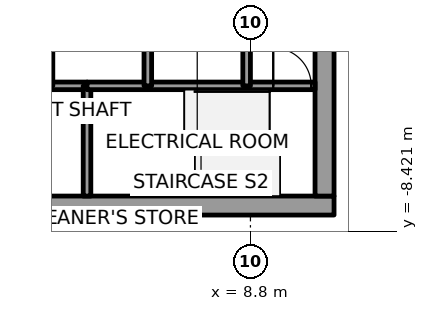
"""IFC4 building model, lengths in metres.
Left out: names, types, materials, properties, quantities, classifications, styles, units other than length and angle.
Written with IfcOpenShell. Run it as: python <this file> out.ifc"""

import sys

from ifc_helpers import new_model, si_unit, direction, frame, frame_2d, origin, place, context, subcontext, project, spatial, rectangle, extrude, element, fill, save


model = new_model("IFC4")
c1 = context("Model", 3, precision=1e-05, world=origin(), true_north=direction((0.0, 1.0)))
c2 = subcontext(c1, "Body", "Model", "MODEL_VIEW")
j1 = project(units=[si_unit("LENGTHUNIT", "METRE"), si_unit("PLANEANGLEUNIT", "RADIAN")], contexts=[c1])
p1 = place(None, origin())
s1 = spatial("IfcSite", under=j1, at=p1, CompositionType="ELEMENT")
p2 = place(p1, origin())
s2 = spatial("IfcBuilding", under=s1, at=p2, CompositionType="ELEMENT")
p3 = place(p2, frame((0.0, 0.0, 16.8)))
s3 = spatial("IfcBuildingStorey", under=s2, at=p3, CompositionType="ELEMENT", Elevation=16.8)
p4 = place(p3, frame((-11.0, -7.75, 0.0), z_axis=(0.0, 0.0, 1.0), x_axis=(1.0, 0.0, 0.0)))
e1 = element("IfcWall", 1, at=p4, inside=s3, PredefinedType="SHEAR", context=c2, shape_type="SweptSolid", body=[
    extrude(rectangle(XDim=22.0, YDim=0.5, at=frame_2d((11.0, 0.0))), origin(), (0.0, 0.0, 1.0), 5.4),
])
p5 = place(p4, frame((10.45, 0.0, 0.0)))
e2 = element("IfcOpeningElement", 2, at=p5, cuts=e1, PredefinedType="OPENING", context=c2, shape_type="SweptSolid", body=[
    extrude(rectangle(XDim=1.1, YDim=2.1, at=frame_2d((0.55, 1.05))), frame((0.0, 0.25, 0.0), z_axis=(0.0, -1.0, 0.0), x_axis=(1.0, 0.0, 0.0)), (0.0, 0.0, 1.0), 0.5),
])
p6 = place(p3, frame((10.75, -7.5, 0.0), z_axis=(0.0, 0.0, 1.0), x_axis=(0.0, 1.0, 0.0)))
e3 = element("IfcWall", 3, at=p6, inside=s3, PredefinedType="SHEAR", context=c2, shape_type="SweptSolid", body=[
    extrude(rectangle(XDim=15.0, YDim=0.5, at=frame_2d((7.5, 0.0))), origin(), (0.0, 0.0, 1.0), 5.4),
])
p7 = place(p6, frame((6.6, 0.0, 0.0)))
e4 = element("IfcOpeningElement", 4, at=p7, cuts=e3, PredefinedType="OPENING", context=c2, shape_type="SweptSolid", body=[
    extrude(rectangle(XDim=1.8, YDim=2.1, at=frame_2d((0.9, 1.05))), frame((0.0, 0.25, 0.0), z_axis=(0.0, -1.0, 0.0), x_axis=(1.0, 0.0, 0.0)), (0.0, 0.0, 1.0), 0.5),
])
p8 = place(p3, frame((3.5, -4.6, 0.0), z_axis=(0.0, 0.0, 1.0), x_axis=(1.0, 0.0, 0.0)))
e5 = element("IfcWall", 5, at=p8, inside=s3, PredefinedType="SOLIDWALL", context=c2, shape_type="SweptSolid", body=[
    extrude(rectangle(XDim=1.0, YDim=0.2, at=frame_2d((0.5, 0.0))), origin(), (0.0, 0.0, 1.0), 5.15),
])
p9 = place(p3, frame((4.5, -7.5, 0.0), z_axis=(0.0, 0.0, 1.0), x_axis=(0.0, 1.0, 0.0)))
e6 = element("IfcWall", 6, at=p9, inside=s3, PredefinedType="SOLIDWALL", context=c2, shape_type="SweptSolid", body=[
    extrude(rectangle(XDim=2.9, YDim=0.2, at=frame_2d((1.45, 0.0))), origin(), (0.0, 0.0, 1.0), 5.15),
])
p10 = place(p3, frame((4.5, -4.6, 0.0), z_axis=(0.0, 0.0, 1.0), x_axis=(1.0, 0.0, 0.0)))
e7 = element("IfcWall", 7, at=p10, inside=s3, PredefinedType="SOLIDWALL", context=c2, shape_type="SweptSolid", body=[
    extrude(rectangle(XDim=1.6, YDim=0.2, at=frame_2d((0.8, 0.0))), origin(), (0.0, 0.0, 1.0), 5.15),
])
p11 = place(p3, frame((6.1, -4.6, 0.0), z_axis=(0.0, 0.0, 1.0), x_axis=(1.0, 0.0, 0.0)))
e8 = element("IfcWall", 8, at=p11, inside=s3, PredefinedType="SOLIDWALL", context=c2, shape_type="SweptSolid", body=[
    extrude(rectangle(XDim=2.6, YDim=0.2, at=frame_2d((1.3, 0.0))), origin(), (0.0, 0.0, 1.0), 5.15),
])
p12 = place(p3, frame((6.1, -4.6, 0.0), z_axis=(0.0, 0.0, 1.0), x_axis=(0.0, 1.0, 0.0)))
e9 = element("IfcWall", 9, at=p12, inside=s3, PredefinedType="SOLIDWALL", context=c2, shape_type="SweptSolid", body=[
    extrude(rectangle(XDim=2.8, YDim=0.2, at=frame_2d((1.4, 0.0))), origin(), (0.0, 0.0, 1.0), 5.15),
])
p13 = place(p3, frame((8.7, -4.6, 0.0), z_axis=(0.0, 0.0, 1.0), x_axis=(1.0, 0.0, 0.0)))
e10 = element("IfcWall", 10, at=p13, inside=s3, PredefinedType="SOLIDWALL", context=c2, shape_type="SweptSolid", body=[
    extrude(rectangle(XDim=1.8, YDim=0.2, at=frame_2d((0.9, 0.0))), origin(), (0.0, 0.0, 1.0), 5.15),
])
p14 = place(p13, frame((0.7, 0.0, 0.0)))
e11 = element("IfcOpeningElement", 11, at=p14, cuts=e10, PredefinedType="OPENING", context=c2, shape_type="SweptSolid", body=[
    extrude(rectangle(XDim=1.0, YDim=2.1, at=frame_2d((0.5, 1.05))), frame((0.0, 0.1, 0.0), z_axis=(0.0, -1.0, 0.0), x_axis=(1.0, 0.0, 0.0)), (0.0, 0.0, 1.0), 0.2),
])
p15 = place(p3, frame((8.7, -4.6, 0.0), z_axis=(0.0, 0.0, 1.0), x_axis=(0.0, 1.0, 0.0)))
e12 = element("IfcWall", 12, at=p15, inside=s3, PredefinedType="SOLIDWALL", context=c2, shape_type="SweptSolid", body=[
    extrude(rectangle(XDim=2.8, YDim=0.2, at=frame_2d((1.4, 0.0))), origin(), (0.0, 0.0, 1.0), 5.15),
])
p16 = place(p14, origin())
e13 = element("IfcDoor", 13, at=p16, inside=s3, OperationType="SINGLE_SWING_RIGHT", PredefinedType="DOOR", context=c2, shape_type="SweptSolid", body=[
    extrude(rectangle(XDim=1.0, YDim=2.1, at=frame_2d((0.5, 1.05))), frame((0.0, 0.025, 0.0), z_axis=(0.0, -1.0, 0.0), x_axis=(1.0, 0.0, 0.0)), (0.0, 0.0, 1.0), 0.05),
])
fill(e11, e13)
save(model, sys.argv[1])
